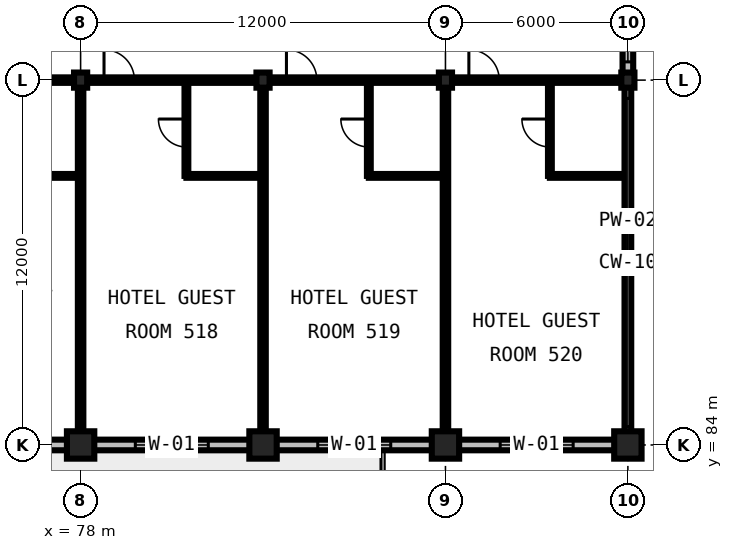
"""IFC4 building model, lengths in metres.
Left out: names, types, materials, properties, quantities, classifications, styles, units other than length and angle.
Written with IfcOpenShell. Run it as: python <this file> out.ifc"""

import sys

from ifc_helpers import new_model, si_unit, direction, frame, frame_2d, origin, origin_2d, place, context, subcontext, project, spatial, rectangle, i_section, extrude, element, fill, save


model = new_model("IFC4")
c1 = context("Model", 3, precision=1e-05, world=origin(), true_north=direction((0.0, 1.0)))
c2 = subcontext(c1, "Body", "Model", "MODEL_VIEW")
j1 = project(units=[si_unit("LENGTHUNIT", "METRE"), si_unit("PLANEANGLEUNIT", "RADIAN")], contexts=[c1])
p1 = place(None, origin())
s1 = spatial("IfcSite", under=j1, at=p1, CompositionType="ELEMENT")
p2 = place(p1, origin())
s2 = spatial("IfcBuilding", under=s1, at=p2, CompositionType="ELEMENT")
p3 = place(p2, frame((0.0, 0.0, 27.6)))
s3 = spatial("IfcBuildingStorey", under=s2, at=p3, CompositionType="ELEMENT", Elevation=27.6)
p4 = place(p3, frame((78.0, 84.0, 0.0), z_axis=(0.0, 0.0, 1.0), x_axis=(1.0, 0.0, 0.0)))
e1 = element("IfcColumn", 1, at=p4, inside=s3, PredefinedType="COLUMN", context=c2, shape_type="SweptSolid", body=[
    extrude(rectangle(XDim=0.9, YDim=0.9, at=origin_2d()), origin(), (0.0, 0.0, 1.0), 3.6),
])
p5 = place(p3, frame((78.0, 96.0, 0.0), z_axis=(0.0, 0.0, 1.0), x_axis=(1.0, 0.0, 0.0)))
e2 = element("IfcColumn", 2, at=p5, inside=s3, PredefinedType="COLUMN", context=c2, shape_type="SweptSolid", body=[
    extrude(i_section(OverallWidth=0.432, OverallDepth=0.498, WebThickness=0.056, FlangeThickness=0.089, FilletRadius=0.031, at=origin_2d()), origin(), (0.0, 0.0, 1.0), 3.6),
])
p6 = place(p3, frame((84.0, 84.0, 0.0), z_axis=(0.0, 0.0, 1.0), x_axis=(1.0, 0.0, 0.0)))
e3 = element("IfcColumn", 3, at=p6, inside=s3, PredefinedType="COLUMN", context=c2, shape_type="SweptSolid", body=[
    extrude(rectangle(XDim=0.9, YDim=0.9, at=origin_2d()), origin(), (0.0, 0.0, 1.0), 3.6),
])
p7 = place(p3, frame((84.0, 96.0, 0.0), z_axis=(0.0, 0.0, 1.0), x_axis=(1.0, 0.0, 0.0)))
e4 = element("IfcColumn", 4, at=p7, inside=s3, PredefinedType="COLUMN", context=c2, shape_type="SweptSolid", body=[
    extrude(i_section(OverallWidth=0.432, OverallDepth=0.498, WebThickness=0.056, FlangeThickness=0.089, FilletRadius=0.031, at=origin_2d()), origin(), (0.0, 0.0, 1.0), 3.6),
])
p8 = place(p3, frame((90.0, 84.0, 0.0), z_axis=(0.0, 0.0, 1.0), x_axis=(1.0, 0.0, 0.0)))
e5 = element("IfcColumn", 5, at=p8, inside=s3, PredefinedType="COLUMN", context=c2, shape_type="SweptSolid", body=[
    extrude(rectangle(XDim=0.9, YDim=0.9, at=origin_2d()), origin(), (0.0, 0.0, 1.0), 3.6),
])
p9 = place(p3, frame((90.0, 96.0, 0.0), z_axis=(0.0, 0.0, 1.0), x_axis=(1.0, 0.0, 0.0)))
e6 = element("IfcColumn", 6, at=p9, inside=s3, PredefinedType="COLUMN", context=c2, shape_type="SweptSolid", body=[
    extrude(i_section(OverallWidth=0.432, OverallDepth=0.498, WebThickness=0.056, FlangeThickness=0.089, FilletRadius=0.031, at=origin_2d()), origin(), (0.0, 0.0, 1.0), 3.6),
])
p10 = place(p3, frame((96.0, 84.0, 0.0), z_axis=(0.0, 0.0, 1.0), x_axis=(1.0, 0.0, 0.0)))
e7 = element("IfcColumn", 7, at=p10, inside=s3, PredefinedType="COLUMN", context=c2, shape_type="SweptSolid", body=[
    extrude(rectangle(XDim=0.9, YDim=0.9, at=origin_2d()), origin(), (0.0, 0.0, 1.0), 3.6),
])
p11 = place(p3, frame((96.0, 96.0, 0.0), z_axis=(0.0, 0.0, 1.0), x_axis=(1.0, 0.0, 0.0)))
e8 = element("IfcColumn", 8, at=p11, inside=s3, PredefinedType="COLUMN", context=c2, shape_type="SweptSolid", body=[
    extrude(i_section(OverallWidth=0.432, OverallDepth=0.498, WebThickness=0.056, FlangeThickness=0.089, FilletRadius=0.031, at=origin_2d()), origin(), (0.0, 0.0, 1.0), 3.6),
])
p12 = place(p3, frame((66.0, 84.0, 0.0), z_axis=(0.0, 0.0, 1.0), x_axis=(1.0, 0.0, 0.0)))
e9 = element("IfcWall", 9, at=p12, inside=s3, PredefinedType="STANDARD", context=c2, shape_type="SweptSolid", body=[
    extrude(rectangle(XDim=12.0, YDim=0.35, at=frame_2d((6.0, 0.0))), origin(), (0.0, 0.0, 1.0), 2.486),
])
p13 = place(p12, frame((1.8, 0.0, 0.75)))
e10 = element("IfcOpeningElement", 10, at=p13, cuts=e9, PredefinedType="OPENING", context=c2, shape_type="SweptSolid", body=[
    extrude(rectangle(XDim=2.4, YDim=1.65, at=frame_2d((1.2, 0.825))), frame((0.0, 0.19, 0.0), z_axis=(0.0, -1.0, 0.0), x_axis=(1.0, 0.0, 0.0)), (0.0, 0.0, 1.0), 0.38),
])
p14 = place(p12, frame((7.725, 0.0, 0.75)))
e11 = element("IfcOpeningElement", 11, at=p14, cuts=e9, PredefinedType="OPENING", context=c2, shape_type="SweptSolid", body=[
    extrude(rectangle(XDim=2.55, YDim=1.65, at=frame_2d((1.275, 0.825))), frame((0.0, 0.19, 0.0), z_axis=(0.0, -1.0, 0.0), x_axis=(1.0, 0.0, 0.0)), (0.0, 0.0, 1.0), 0.38),
])
p15 = place(p3, frame((78.0, 84.0, 0.0), z_axis=(0.0, 0.0, 1.0), x_axis=(1.0, 0.0, 0.0)))
e12 = element("IfcWall", 12, at=p15, inside=s3, PredefinedType="STANDARD", context=c2, shape_type="SweptSolid", body=[
    extrude(rectangle(XDim=6.0, YDim=0.35, at=frame_2d((3.0, 0.0))), origin(), (0.0, 0.0, 1.0), 2.486),
])
p16 = place(p15, frame((1.8, 0.0, 0.75)))
e13 = element("IfcOpeningElement", 13, at=p16, cuts=e12, PredefinedType="OPENING", context=c2, shape_type="SweptSolid", body=[
    extrude(rectangle(XDim=2.4, YDim=1.65, at=frame_2d((1.2, 0.825))), frame((0.0, 0.19, 0.0), z_axis=(0.0, -1.0, 0.0), x_axis=(1.0, 0.0, 0.0)), (0.0, 0.0, 1.0), 0.38),
])
p17 = place(p3, frame((84.0, 84.0, 0.0), z_axis=(0.0, 0.0, 1.0), x_axis=(1.0, 0.0, 0.0)))
e14 = element("IfcWall", 14, at=p17, inside=s3, PredefinedType="STANDARD", context=c2, shape_type="SweptSolid", body=[
    extrude(rectangle(XDim=6.0, YDim=0.35, at=frame_2d((3.0, 0.0))), origin(), (0.0, 0.0, 1.0), 2.486),
])
p18 = place(p17, frame((1.8, 0.0, 0.75)))
e15 = element("IfcOpeningElement", 15, at=p18, cuts=e14, PredefinedType="OPENING", context=c2, shape_type="SweptSolid", body=[
    extrude(rectangle(XDim=2.4, YDim=1.65, at=frame_2d((1.2, 0.825))), frame((0.0, 0.19, 0.0), z_axis=(0.0, -1.0, 0.0), x_axis=(1.0, 0.0, 0.0)), (0.0, 0.0, 1.0), 0.38),
])
p19 = place(p3, frame((90.0, 84.0, 0.0), z_axis=(0.0, 0.0, 1.0), x_axis=(1.0, 0.0, 0.0)))
e16 = element("IfcWall", 16, at=p19, inside=s3, PredefinedType="STANDARD", context=c2, shape_type="SweptSolid", body=[
    extrude(rectangle(XDim=6.0, YDim=0.35, at=frame_2d((3.0, 0.0))), origin(), (0.0, 0.0, 1.0), 2.486),
])
p20 = place(p19, frame((1.8, 0.0, 0.75)))
e17 = element("IfcOpeningElement", 17, at=p20, cuts=e16, PredefinedType="OPENING", context=c2, shape_type="SweptSolid", body=[
    extrude(rectangle(XDim=2.4, YDim=1.65, at=frame_2d((1.2, 0.825))), frame((0.0, 0.19, 0.0), z_axis=(0.0, -1.0, 0.0), x_axis=(1.0, 0.0, 0.0)), (0.0, 0.0, 1.0), 0.38),
])
p21 = place(p3, frame((96.0, 84.0, 0.0), z_axis=(0.0, 0.0, 1.0), x_axis=(0.0, 1.0, 0.0)))
e18 = element("IfcWall", 18, at=p21, inside=s3, PredefinedType="PARAPET", context=c2, shape_type="SweptSolid", body=[
    extrude(rectangle(XDim=12.0, YDim=0.22, at=frame_2d((6.0, 0.0))), origin(), (0.0, 0.0, 1.0), 0.2),
])
p22 = place(p3, frame((96.0, 96.0, 0.0), z_axis=(0.0, 0.0, 1.0), x_axis=(0.0, 1.0, 0.0)))
e19 = element("IfcWall", 19, at=p22, inside=s3, PredefinedType="STANDARD", context=c2, shape_type="SweptSolid", body=[
    extrude(rectangle(XDim=9.0, YDim=0.35, at=frame_2d((4.5, 0.0))), origin(), (0.0, 0.0, 1.0), 2.981),
])
p23 = place(p22, frame((0.6, 0.0, 0.85)))
e20 = element("IfcOpeningElement", 20, at=p23, cuts=e19, PredefinedType="OPENING", context=c2, shape_type="SweptSolid", body=[
    extrude(rectangle(XDim=1.8, YDim=1.5, at=frame_2d((0.9, 0.75))), frame((0.0, 0.19, 0.0), z_axis=(0.0, -1.0, 0.0), x_axis=(1.0, 0.0, 0.0)), (0.0, 0.0, 1.0), 0.38),
])
p24 = place(p3, frame((72.0, 96.0, 0.0), z_axis=(0.0, 0.0, 1.0), x_axis=(1.0, 0.0, 0.0)))
e21 = element("IfcWall", 21, at=p24, inside=s3, PredefinedType="PARTITIONING", context=c2, shape_type="SweptSolid", body=[
    extrude(rectangle(XDim=6.0, YDim=0.18, at=frame_2d((3.0, 0.0))), origin(), (0.0, 0.0, 1.0), 2.664),
])
p25 = place(p24, frame((0.55, 0.0, 0.0)))
e22 = element("IfcOpeningElement", 22, at=p25, cuts=e21, PredefinedType="OPENING", context=c2, shape_type="SweptSolid", body=[
    extrude(rectangle(XDim=1.0, YDim=2.15, at=frame_2d((0.5, 1.075))), frame((0.0, 0.105, 0.0), z_axis=(0.0, -1.0, 0.0), x_axis=(1.0, 0.0, 0.0)), (0.0, 0.0, 1.0), 0.21),
])
p26 = place(p3, frame((78.0, 84.175, 0.0), z_axis=(0.0, 0.0, 1.0), x_axis=(0.0, 1.0, 0.0)))
e23 = element("IfcWall", 23, at=p26, inside=s3, PredefinedType="PARTITIONING", context=c2, shape_type="SweptSolid", body=[
    extrude(rectangle(XDim=11.825, YDim=0.18, at=frame_2d((5.913, 0.0))), origin(), (0.0, 0.0, 1.0), 2.59),
])
p27 = place(p3, frame((75.48, 92.85, 0.0), z_axis=(0.0, 0.0, 1.0), x_axis=(1.0, 0.0, 0.0)))
e24 = element("IfcWall", 24, at=p27, inside=s3, PredefinedType="PARTITIONING", context=c2, shape_type="SweptSolid", body=[
    extrude(rectangle(XDim=2.52, YDim=0.125, at=frame_2d((1.26, 0.0))), origin(), (0.0, 0.0, 1.0), 3.29),
])
p28 = place(p3, frame((78.0, 96.0, 0.0), z_axis=(0.0, 0.0, 1.0), x_axis=(1.0, 0.0, 0.0)))
e25 = element("IfcWall", 25, at=p28, inside=s3, PredefinedType="PARTITIONING", context=c2, shape_type="SweptSolid", body=[
    extrude(rectangle(XDim=6.0, YDim=0.18, at=frame_2d((3.0, 0.0))), origin(), (0.0, 0.0, 1.0), 2.736),
])
p29 = place(p28, frame((0.77, 0.0, 0.0)))
e26 = element("IfcOpeningElement", 26, at=p29, cuts=e25, PredefinedType="OPENING", context=c2, shape_type="SweptSolid", body=[
    extrude(rectangle(XDim=1.0, YDim=2.15, at=frame_2d((0.5, 1.075))), frame((0.0, 0.105, 0.0), z_axis=(0.0, -1.0, 0.0), x_axis=(1.0, 0.0, 0.0)), (0.0, 0.0, 1.0), 0.21),
])
p30 = place(p3, frame((84.0, 84.175, 0.0), z_axis=(0.0, 0.0, 1.0), x_axis=(0.0, 1.0, 0.0)))
e27 = element("IfcWall", 27, at=p30, inside=s3, PredefinedType="PARTITIONING", context=c2, shape_type="SweptSolid", body=[
    extrude(rectangle(XDim=11.825, YDim=0.18, at=frame_2d((5.913, 0.0))), origin(), (0.0, 0.0, 1.0), 2.59),
])
p31 = place(p3, frame((81.48, 92.85, 0.0), z_axis=(0.0, 0.0, 1.0), x_axis=(0.0, 1.0, 0.0)))
e28 = element("IfcWall", 28, at=p31, inside=s3, PredefinedType="PARTITIONING", context=c2, shape_type="SweptSolid", body=[
    extrude(rectangle(XDim=3.06, YDim=0.125, at=frame_2d((1.53, 0.0))), origin(), (0.0, 0.0, 1.0), 3.29),
])
p32 = place(p31, frame((0.95, 0.0, 0.0)))
e29 = element("IfcOpeningElement", 29, at=p32, cuts=e28, PredefinedType="OPENING", context=c2, shape_type="SweptSolid", body=[
    extrude(rectangle(XDim=0.92, YDim=2.1, at=frame_2d((0.46, 1.05))), frame((0.0, 0.077, 0.0), z_axis=(0.0, -1.0, 0.0), x_axis=(1.0, 0.0, 0.0)), (0.0, 0.0, 1.0), 0.155),
])
p33 = place(p3, frame((81.48, 92.85, 0.0), z_axis=(0.0, 0.0, 1.0), x_axis=(1.0, 0.0, 0.0)))
e30 = element("IfcWall", 30, at=p33, inside=s3, PredefinedType="PARTITIONING", context=c2, shape_type="SweptSolid", body=[
    extrude(rectangle(XDim=2.52, YDim=0.125, at=frame_2d((1.26, 0.0))), origin(), (0.0, 0.0, 1.0), 3.29),
])
p34 = place(p3, frame((84.0, 96.0, 0.0), z_axis=(0.0, 0.0, 1.0), x_axis=(1.0, 0.0, 0.0)))
e31 = element("IfcWall", 31, at=p34, inside=s3, PredefinedType="PARTITIONING", context=c2, shape_type="SweptSolid", body=[
    extrude(rectangle(XDim=6.0, YDim=0.18, at=frame_2d((3.0, 0.0))), origin(), (0.0, 0.0, 1.0), 2.736),
])
p35 = place(p34, frame((0.77, 0.0, 0.0)))
e32 = element("IfcOpeningElement", 32, at=p35, cuts=e31, PredefinedType="OPENING", context=c2, shape_type="SweptSolid", body=[
    extrude(rectangle(XDim=1.0, YDim=2.15, at=frame_2d((0.5, 1.075))), frame((0.0, 0.105, 0.0), z_axis=(0.0, -1.0, 0.0), x_axis=(1.0, 0.0, 0.0)), (0.0, 0.0, 1.0), 0.21),
])
p36 = place(p3, frame((90.0, 84.175, 0.0), z_axis=(0.0, 0.0, 1.0), x_axis=(0.0, 1.0, 0.0)))
e33 = element("IfcWall", 33, at=p36, inside=s3, PredefinedType="PARTITIONING", context=c2, shape_type="SweptSolid", body=[
    extrude(rectangle(XDim=11.825, YDim=0.18, at=frame_2d((5.913, 0.0))), origin(), (0.0, 0.0, 1.0), 2.59),
])
p37 = place(p3, frame((87.48, 92.85, 0.0), z_axis=(0.0, 0.0, 1.0), x_axis=(0.0, 1.0, 0.0)))
e34 = element("IfcWall", 34, at=p37, inside=s3, PredefinedType="PARTITIONING", context=c2, shape_type="SweptSolid", body=[
    extrude(rectangle(XDim=3.06, YDim=0.125, at=frame_2d((1.53, 0.0))), origin(), (0.0, 0.0, 1.0), 3.29),
])
p38 = place(p37, frame((0.95, 0.0, 0.0)))
e35 = element("IfcOpeningElement", 35, at=p38, cuts=e34, PredefinedType="OPENING", context=c2, shape_type="SweptSolid", body=[
    extrude(rectangle(XDim=0.92, YDim=2.1, at=frame_2d((0.46, 1.05))), frame((0.0, 0.077, 0.0), z_axis=(0.0, -1.0, 0.0), x_axis=(1.0, 0.0, 0.0)), (0.0, 0.0, 1.0), 0.155),
])
p39 = place(p3, frame((87.48, 92.85, 0.0), z_axis=(0.0, 0.0, 1.0), x_axis=(1.0, 0.0, 0.0)))
e36 = element("IfcWall", 36, at=p39, inside=s3, PredefinedType="PARTITIONING", context=c2, shape_type="SweptSolid", body=[
    extrude(rectangle(XDim=2.52, YDim=0.125, at=frame_2d((1.26, 0.0))), origin(), (0.0, 0.0, 1.0), 3.29),
])
p40 = place(p3, frame((90.0, 96.0, 0.0), z_axis=(0.0, 0.0, 1.0), x_axis=(1.0, 0.0, 0.0)))
e37 = element("IfcWall", 37, at=p40, inside=s3, PredefinedType="PARTITIONING", context=c2, shape_type="SweptSolid", body=[
    extrude(rectangle(XDim=5.915, YDim=0.18, at=frame_2d((2.957, 0.0))), origin(), (0.0, 0.0, 1.0), 2.736),
])
p41 = place(p40, frame((0.77, 0.0, 0.0)))
e38 = element("IfcOpeningElement", 38, at=p41, cuts=e37, PredefinedType="OPENING", context=c2, shape_type="SweptSolid", body=[
    extrude(rectangle(XDim=1.0, YDim=2.15, at=frame_2d((0.5, 1.075))), frame((0.0, 0.105, 0.0), z_axis=(0.0, -1.0, 0.0), x_axis=(1.0, 0.0, 0.0)), (0.0, 0.0, 1.0), 0.21),
])
p42 = place(p3, frame((93.435, 92.85, 0.0), z_axis=(0.0, 0.0, 1.0), x_axis=(0.0, 1.0, 0.0)))
e39 = element("IfcWall", 39, at=p42, inside=s3, PredefinedType="PARTITIONING", context=c2, shape_type="SweptSolid", body=[
    extrude(rectangle(XDim=3.06, YDim=0.125, at=frame_2d((1.53, 0.0))), origin(), (0.0, 0.0, 1.0), 3.29),
])
p43 = place(p42, frame((0.95, 0.0, 0.0)))
e40 = element("IfcOpeningElement", 40, at=p43, cuts=e39, PredefinedType="OPENING", context=c2, shape_type="SweptSolid", body=[
    extrude(rectangle(XDim=0.92, YDim=2.1, at=frame_2d((0.46, 1.05))), frame((0.0, 0.077, 0.0), z_axis=(0.0, -1.0, 0.0), x_axis=(1.0, 0.0, 0.0)), (0.0, 0.0, 1.0), 0.155),
])
p44 = place(p3, frame((93.435, 92.85, 0.0), z_axis=(0.0, 0.0, 1.0), x_axis=(1.0, 0.0, 0.0)))
e41 = element("IfcWall", 41, at=p44, inside=s3, PredefinedType="PARTITIONING", context=c2, shape_type="SweptSolid", body=[
    extrude(rectangle(XDim=2.48, YDim=0.125, at=frame_2d((1.24, 0.0))), origin(), (0.0, 0.0, 1.0), 3.29),
])
p45 = place(p16, origin())
e42 = element("IfcWindow", 42, at=p45, inside=s3, PartitioningType="DOUBLE_PANEL_VERTICAL", PredefinedType="WINDOW", context=c2, shape_type="SweptSolid", body=[
    extrude(rectangle(XDim=2.4, YDim=1.65, at=frame_2d((1.2, 0.825))), frame((0.0, 0.03, 0.0), z_axis=(0.0, -1.0, 0.0), x_axis=(1.0, 0.0, 0.0)), (0.0, 0.0, 1.0), 0.06),
])
fill(e13, e42)
p46 = place(p18, origin())
e43 = element("IfcWindow", 43, at=p46, inside=s3, PartitioningType="DOUBLE_PANEL_VERTICAL", PredefinedType="WINDOW", context=c2, shape_type="SweptSolid", body=[
    extrude(rectangle(XDim=2.4, YDim=1.65, at=frame_2d((1.2, 0.825))), frame((0.0, 0.03, 0.0), z_axis=(0.0, -1.0, 0.0), x_axis=(1.0, 0.0, 0.0)), (0.0, 0.0, 1.0), 0.06),
])
fill(e15, e43)
p47 = place(p20, origin())
e44 = element("IfcWindow", 44, at=p47, inside=s3, PartitioningType="DOUBLE_PANEL_VERTICAL", PredefinedType="WINDOW", context=c2, shape_type="SweptSolid", body=[
    extrude(rectangle(XDim=2.4, YDim=1.65, at=frame_2d((1.2, 0.825))), frame((0.0, 0.03, 0.0), z_axis=(0.0, -1.0, 0.0), x_axis=(1.0, 0.0, 0.0)), (0.0, 0.0, 1.0), 0.06),
])
fill(e17, e44)
p48 = place(p23, origin())
e45 = element("IfcWindow", 45, at=p48, inside=s3, PartitioningType="SINGLE_PANEL", PredefinedType="WINDOW", context=c2, shape_type="SweptSolid", body=[
    extrude(rectangle(XDim=1.8, YDim=1.5, at=frame_2d((0.9, 0.75))), frame((0.0, 0.03, 0.0), z_axis=(0.0, -1.0, 0.0), x_axis=(1.0, 0.0, 0.0)), (0.0, 0.0, 1.0), 0.06),
])
fill(e20, e45)
p49 = place(p29, origin())
e46 = element("IfcDoor", 46, at=p49, inside=s3, OperationType="SINGLE_SWING_LEFT", PredefinedType="DOOR", context=c2, shape_type="SweptSolid", body=[
    extrude(rectangle(XDim=1.0, YDim=2.15, at=frame_2d((0.5, 1.075))), frame((0.0, 0.025, 0.0), z_axis=(0.0, -1.0, 0.0), x_axis=(1.0, 0.0, 0.0)), (0.0, 0.0, 1.0), 0.05),
])
fill(e26, e46)
p50 = place(p32, origin())
e47 = element("IfcDoor", 47, at=p50, inside=s3, OperationType="SINGLE_SWING_RIGHT", PredefinedType="DOOR", context=c2, shape_type="SweptSolid", body=[
    extrude(rectangle(XDim=0.92, YDim=2.1, at=frame_2d((0.46, 1.05))), frame((0.0, 0.025, 0.0), z_axis=(0.0, -1.0, 0.0), x_axis=(1.0, 0.0, 0.0)), (0.0, 0.0, 1.0), 0.05),
])
fill(e29, e47)
p51 = place(p35, origin())
e48 = element("IfcDoor", 48, at=p51, inside=s3, OperationType="SINGLE_SWING_LEFT", PredefinedType="DOOR", context=c2, shape_type="SweptSolid", body=[
    extrude(rectangle(XDim=1.0, YDim=2.15, at=frame_2d((0.5, 1.075))), frame((0.0, 0.025, 0.0), z_axis=(0.0, -1.0, 0.0), x_axis=(1.0, 0.0, 0.0)), (0.0, 0.0, 1.0), 0.05),
])
fill(e32, e48)
p52 = place(p38, origin())
e49 = element("IfcDoor", 49, at=p52, inside=s3, OperationType="SINGLE_SWING_RIGHT", PredefinedType="DOOR", context=c2, shape_type="SweptSolid", body=[
    extrude(rectangle(XDim=0.92, YDim=2.1, at=frame_2d((0.46, 1.05))), frame((0.0, 0.025, 0.0), z_axis=(0.0, -1.0, 0.0), x_axis=(1.0, 0.0, 0.0)), (0.0, 0.0, 1.0), 0.05),
])
fill(e35, e49)
p53 = place(p41, origin())
e50 = element("IfcDoor", 50, at=p53, inside=s3, OperationType="SINGLE_SWING_LEFT", PredefinedType="DOOR", context=c2, shape_type="SweptSolid", body=[
    extrude(rectangle(XDim=1.0, YDim=2.15, at=frame_2d((0.5, 1.075))), frame((0.0, 0.025, 0.0), z_axis=(0.0, -1.0, 0.0), x_axis=(1.0, 0.0, 0.0)), (0.0, 0.0, 1.0), 0.05),
])
fill(e38, e50)
p54 = place(p43, origin())
e51 = element("IfcDoor", 51, at=p54, inside=s3, OperationType="SINGLE_SWING_RIGHT", PredefinedType="DOOR", context=c2, shape_type="SweptSolid", body=[
    extrude(rectangle(XDim=0.92, YDim=2.1, at=frame_2d((0.46, 1.05))), frame((0.0, 0.025, 0.0), z_axis=(0.0, -1.0, 0.0), x_axis=(1.0, 0.0, 0.0)), (0.0, 0.0, 1.0), 0.05),
])
fill(e40, e51)
save(model, sys.argv[1])
